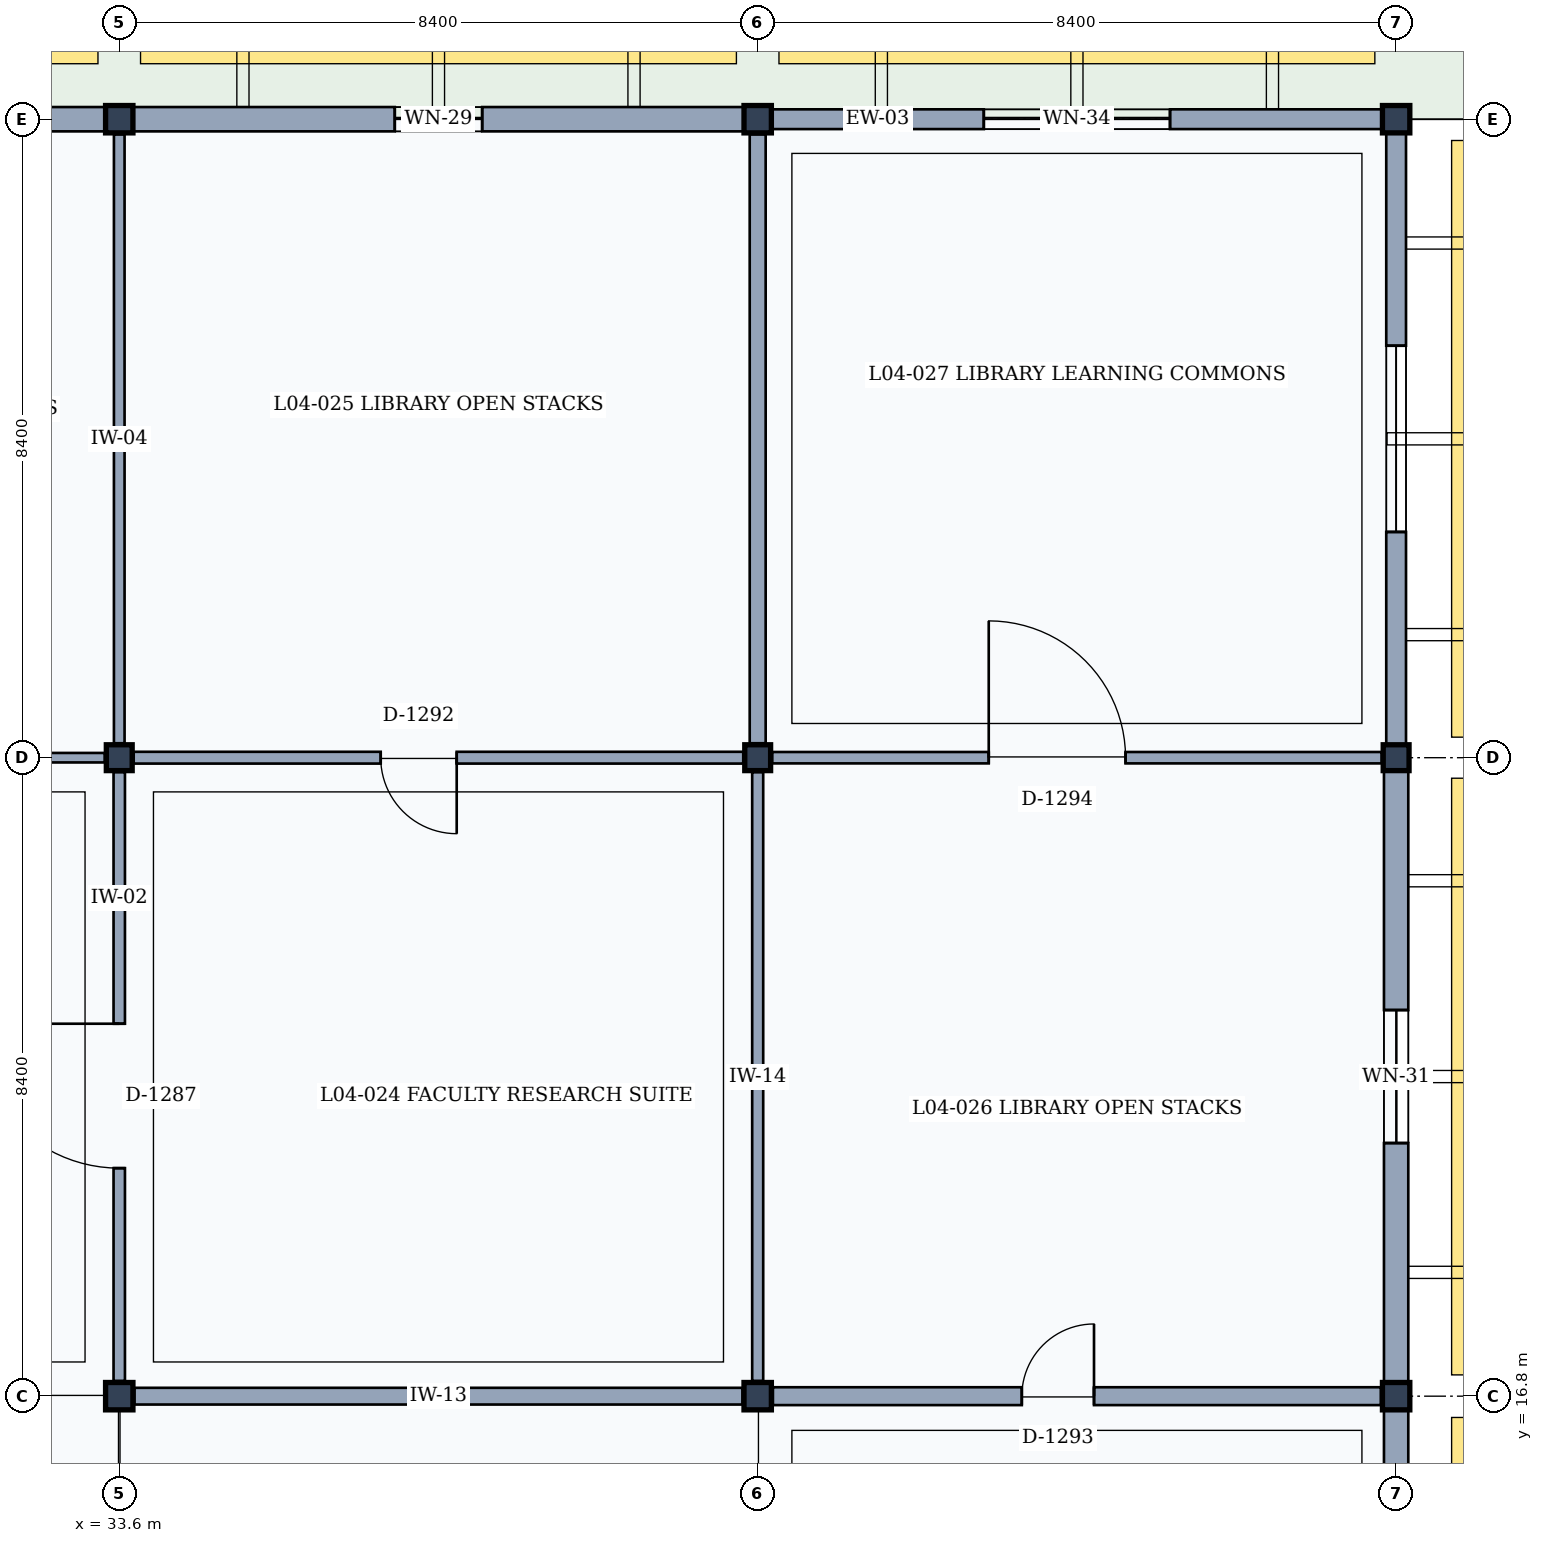
"""IFC4 building model, lengths in metres.
Left out: names, types, materials, properties, quantities, classifications, styles, units other than length and angle.
Written with IfcOpenShell. Run it as: python <this file> out.ifc"""

import sys

from ifc_helpers import new_model, si_unit, direction, frame, frame_2d, origin, origin_2d, place, context, subcontext, project, spatial, rectangle, extrude, element, fill, save


model = new_model("IFC4")
c1 = context("Model", 3, precision=1e-05, world=origin(), true_north=direction((0.0, 1.0)))
c2 = subcontext(c1, "Body", "Model", "MODEL_VIEW")
j1 = project(units=[si_unit("LENGTHUNIT", "METRE"), si_unit("PLANEANGLEUNIT", "RADIAN")], contexts=[c1])
p1 = place(None, origin())
s1 = spatial("IfcSite", under=j1, at=p1, CompositionType="ELEMENT")
p2 = place(p1, origin())
s2 = spatial("IfcBuilding", under=s1, at=p2, CompositionType="ELEMENT")
p3 = place(p2, frame((0.0, 0.0, 18.0)))
s3 = spatial("IfcBuildingStorey", under=s2, at=p3, CompositionType="ELEMENT", Elevation=18.0)
p4 = place(p3, frame((33.6, 16.8, 0.0), z_axis=(0.0, 0.0, 1.0), x_axis=(1.0, 0.0, 0.0)))
e1 = element("IfcColumn", 1, at=p4, inside=s3, PredefinedType="COLUMN", context=c2, shape_type="SweptSolid", body=[
    extrude(rectangle(XDim=0.36, YDim=0.36, at=origin_2d()), origin(), (0.0, 0.0, 1.0), 4.2),
])
p5 = place(p3, frame((33.6, 25.2, 0.0), z_axis=(0.0, 0.0, 1.0), x_axis=(1.0, 0.0, 0.0)))
e2 = element("IfcColumn", 2, at=p5, inside=s3, PredefinedType="COLUMN", context=c2, shape_type="SweptSolid", body=[
    extrude(rectangle(XDim=0.34, YDim=0.34, at=origin_2d()), origin(), (0.0, 0.0, 1.0), 4.2),
])
for number, where, z_axis, x_axis in (
    (3, (33.6, 33.6, 0.0), (0.0, 0.0, 1.0), (1.0, 0.0, 0.0)),
    (4, (42.0, 16.8, 0.0), (0.0, 0.0, 1.0), (1.0, 0.0, 0.0)),
):
    element("IfcColumn", number, at=place(p3, frame(where, z_axis=z_axis, x_axis=x_axis)), inside=s3, PredefinedType="COLUMN", context=c2, shape_type="SweptSolid", body=[
        extrude(rectangle(XDim=0.36, YDim=0.36, at=origin_2d()), origin(), (0.0, 0.0, 1.0), 4.2),
    ])
p6 = place(p3, frame((42.0, 25.2, 0.0), z_axis=(0.0, 0.0, 1.0), x_axis=(1.0, 0.0, 0.0)))
e5 = element("IfcColumn", 5, at=p6, inside=s3, PredefinedType="COLUMN", context=c2, shape_type="SweptSolid", body=[
    extrude(rectangle(XDim=0.34, YDim=0.34, at=origin_2d()), origin(), (0.0, 0.0, 1.0), 4.2),
])
for number, where, z_axis, x_axis in (
    (6, (42.0, 33.6, 0.0), (0.0, 0.0, 1.0), (1.0, 0.0, 0.0)),
    (7, (50.4, 16.8, 0.0), (0.0, 0.0, 1.0), (1.0, 0.0, 0.0)),
):
    element("IfcColumn", number, at=place(p3, frame(where, z_axis=z_axis, x_axis=x_axis)), inside=s3, PredefinedType="COLUMN", context=c2, shape_type="SweptSolid", body=[
        extrude(rectangle(XDim=0.36, YDim=0.36, at=origin_2d()), origin(), (0.0, 0.0, 1.0), 4.2),
    ])
p7 = place(p3, frame((50.4, 25.2, 0.0), z_axis=(0.0, 0.0, 1.0), x_axis=(1.0, 0.0, 0.0)))
e8 = element("IfcColumn", 8, at=p7, inside=s3, PredefinedType="COLUMN", context=c2, shape_type="SweptSolid", body=[
    extrude(rectangle(XDim=0.34, YDim=0.34, at=origin_2d()), origin(), (0.0, 0.0, 1.0), 4.2),
])
p8 = place(p3, frame((50.4, 33.6, 0.0), z_axis=(0.0, 0.0, 1.0), x_axis=(1.0, 0.0, 0.0)))
e9 = element("IfcColumn", 9, at=p8, inside=s3, PredefinedType="COLUMN", context=c2, shape_type="SweptSolid", body=[
    extrude(rectangle(XDim=0.36, YDim=0.36, at=origin_2d()), origin(), (0.0, 0.0, 1.0), 4.2),
])
p9 = place(p3, frame((25.38, 33.6, 0.0), z_axis=(0.0, 0.0, 1.0), x_axis=(1.0, 0.0, 0.0)))
e10 = element("IfcWall", 10, at=p9, inside=s3, PredefinedType="SOLIDWALL", context=c2, shape_type="SweptSolid", body=[
    extrude(rectangle(XDim=8.04, YDim=0.32, at=frame_2d((4.02, 0.0))), origin(), (0.0, 0.0, 1.0), 3.36),
])
p10 = place(p9, frame((3.095, 0.0, 0.9)))
e11 = element("IfcOpeningElement", 11, at=p10, cuts=e10, PredefinedType="OPENING", context=c2, shape_type="SweptSolid", body=[
    extrude(rectangle(XDim=1.85, YDim=1.65, at=frame_2d((0.925, 0.825))), frame((0.0, 0.17, 0.0), z_axis=(0.0, -1.0, 0.0), x_axis=(1.0, 0.0, 0.0)), (0.0, 0.0, 1.0), 0.34),
])
p11 = place(p3, frame((33.78, 33.6, 0.0), z_axis=(0.0, 0.0, 1.0), x_axis=(1.0, 0.0, 0.0)))
e12 = element("IfcWall", 12, at=p11, inside=s3, PredefinedType="SOLIDWALL", context=c2, shape_type="SweptSolid", body=[
    extrude(rectangle(XDim=8.04, YDim=0.32, at=frame_2d((4.02, 0.0))), origin(), (0.0, 0.0, 1.0), 3.36),
])
p12 = place(p11, frame((3.445, 0.0, 0.9)))
e13 = element("IfcOpeningElement", 13, at=p12, cuts=e12, PredefinedType="OPENING", context=c2, shape_type="SweptSolid", body=[
    extrude(rectangle(XDim=1.15, YDim=1.65, at=frame_2d((0.575, 0.825))), frame((0.0, 0.17, 0.0), z_axis=(0.0, -1.0, 0.0), x_axis=(1.0, 0.0, 0.0)), (0.0, 0.0, 1.0), 0.34),
])
p13 = place(p3, frame((50.4, 16.62, 0.0), z_axis=(0.0, 0.0, 1.0), x_axis=(0.0, -1.0, 0.0)))
e14 = element("IfcWall", 14, at=p13, inside=s3, PredefinedType="SOLIDWALL", context=c2, shape_type="SweptSolid", body=[
    extrude(rectangle(XDim=8.05, YDim=0.32, at=frame_2d((4.025, 0.0))), origin(), (0.0, 0.0, 1.0), 3.36),
])
p14 = place(p13, frame((2.65, 0.0, 0.9)))
e15 = element("IfcOpeningElement", 15, at=p14, cuts=e14, PredefinedType="OPENING", context=c2, shape_type="SweptSolid", body=[
    extrude(rectangle(XDim=2.75, YDim=1.85, at=frame_2d((1.375, 0.925))), frame((0.0, 0.17, 0.0), z_axis=(0.0, -1.0, 0.0), x_axis=(1.0, 0.0, 0.0)), (0.0, 0.0, 1.0), 0.34),
])
p15 = place(p3, frame((50.4, 25.03, 0.0), z_axis=(0.0, 0.0, 1.0), x_axis=(0.0, -1.0, 0.0)))
e16 = element("IfcWall", 16, at=p15, inside=s3, PredefinedType="SOLIDWALL", context=c2, shape_type="SweptSolid", body=[
    extrude(rectangle(XDim=8.05, YDim=0.32, at=frame_2d((4.025, 0.0))), origin(), (0.0, 0.0, 1.0), 3.36),
])
p16 = place(p15, frame((3.15, 0.0, 0.9)))
e17 = element("IfcOpeningElement", 17, at=p16, cuts=e16, PredefinedType="OPENING", context=c2, shape_type="SweptSolid", body=[
    extrude(rectangle(XDim=1.75, YDim=1.85, at=frame_2d((0.875, 0.925))), frame((0.0, 0.17, 0.0), z_axis=(0.0, -1.0, 0.0), x_axis=(1.0, 0.0, 0.0)), (0.0, 0.0, 1.0), 0.34),
])
p17 = place(p3, frame((42.18, 33.6, 0.0), z_axis=(0.0, 0.0, 1.0), x_axis=(1.0, 0.0, 0.0)))
e18 = element("IfcWall", 18, at=p17, inside=s3, PredefinedType="SOLIDWALL", context=c2, shape_type="SweptSolid", body=[
    extrude(rectangle(XDim=8.04, YDim=0.26, at=frame_2d((4.02, 0.0))), origin(), (0.0, 0.0, 1.0), 3.36),
])
p18 = place(p17, frame((2.795, 0.0, 0.9)))
e19 = element("IfcOpeningElement", 19, at=p18, cuts=e18, PredefinedType="OPENING", context=c2, shape_type="SweptSolid", body=[
    extrude(rectangle(XDim=2.45, YDim=1.9, at=frame_2d((1.225, 0.95))), frame((0.0, 0.14, 0.0), z_axis=(0.0, -1.0, 0.0), x_axis=(1.0, 0.0, 0.0)), (0.0, 0.0, 1.0), 0.28),
])
p19 = place(p3, frame((50.4, 33.42, 0.0), z_axis=(0.0, 0.0, 1.0), x_axis=(0.0, -1.0, 0.0)))
e20 = element("IfcWall", 20, at=p19, inside=s3, PredefinedType="SOLIDWALL", context=c2, shape_type="SweptSolid", body=[
    extrude(rectangle(XDim=8.05, YDim=0.26, at=frame_2d((4.025, 0.0))), origin(), (0.0, 0.0, 1.0), 3.36),
])
p20 = place(p19, frame((2.8, 0.0, 0.9)))
e21 = element("IfcOpeningElement", 21, at=p20, cuts=e20, PredefinedType="OPENING", context=c2, shape_type="SweptSolid", body=[
    extrude(rectangle(XDim=2.45, YDim=1.9, at=frame_2d((1.225, 0.95))), frame((0.0, 0.14, 0.0), z_axis=(0.0, -1.0, 0.0), x_axis=(1.0, 0.0, 0.0)), (0.0, 0.0, 1.0), 0.28),
])
p21 = place(p3, frame((33.6, 17.0, 0.0), z_axis=(0.0, 0.0, 1.0), x_axis=(0.0, 1.0, 0.0)))
e22 = element("IfcWall", 22, at=p21, inside=s3, PredefinedType="PARTITIONING", context=c2, shape_type="SweptSolid", body=[
    extrude(rectangle(XDim=8.01, YDim=0.15, at=frame_2d((4.005, 0.0))), origin(), (0.0, 0.0, 1.0), 3.32),
])
p22 = place(p21, frame((2.8, 0.0, 0.0)))
e23 = element("IfcOpeningElement", 23, at=p22, cuts=e22, PredefinedType="OPENING", context=c2, shape_type="SweptSolid", body=[
    extrude(rectangle(XDim=1.9, YDim=2.4, at=frame_2d((0.95, 1.2))), frame((0.0, 0.085, 0.0), z_axis=(0.0, -1.0, 0.0), x_axis=(1.0, 0.0, 0.0)), (0.0, 0.0, 1.0), 0.17),
])
p23 = place(p3, frame((25.39, 25.2, 0.0), z_axis=(0.0, 0.0, 1.0), x_axis=(1.0, 0.0, 0.0)))
e24 = element("IfcWall", 24, at=p23, inside=s3, PredefinedType="PARTITIONING", context=c2, shape_type="SweptSolid", body=[
    extrude(rectangle(XDim=8.02, YDim=0.125, at=frame_2d((4.01, 0.0))), origin(), (0.0, 0.0, 1.0), 3.32),
])
p24 = place(p23, frame((3.3, 0.0, 0.0)))
e25 = element("IfcOpeningElement", 25, at=p24, cuts=e24, PredefinedType="OPENING", context=c2, shape_type="SweptSolid", body=[
    extrude(rectangle(XDim=0.9, YDim=2.1, at=frame_2d((0.45, 1.05))), frame((0.0, 0.073, 0.0), z_axis=(0.0, -1.0, 0.0), x_axis=(1.0, 0.0, 0.0)), (0.0, 0.0, 1.0), 0.145),
])
p25 = place(p3, frame((33.6, 25.39, 0.0), z_axis=(0.0, 0.0, 1.0), x_axis=(0.0, 1.0, 0.0)))
e26 = element("IfcWall", 26, at=p25, inside=s3, PredefinedType="PARTITIONING", context=c2, shape_type="SweptSolid", body=[
    extrude(rectangle(XDim=8.01, YDim=0.14, at=frame_2d((4.005, 0.0))), origin(), (0.0, 0.0, 1.0), 3.32),
])
p26 = place(p3, frame((33.8, 16.8, 0.0), z_axis=(0.0, 0.0, 1.0), x_axis=(1.0, 0.0, 0.0)))
e27 = element("IfcWall", 27, at=p26, inside=s3, PredefinedType="PARTITIONING", context=c2, shape_type="SweptSolid", body=[
    extrude(rectangle(XDim=8.0, YDim=0.22, at=frame_2d((4.0, 0.0))), origin(), (0.0, 0.0, 1.0), 3.32),
])
p27 = place(p3, frame((42.0, 17.0, 0.0), z_axis=(0.0, 0.0, 1.0), x_axis=(0.0, 1.0, 0.0)))
e28 = element("IfcWall", 28, at=p27, inside=s3, PredefinedType="PARTITIONING", context=c2, shape_type="SweptSolid", body=[
    extrude(rectangle(XDim=8.01, YDim=0.145, at=frame_2d((4.005, 0.0))), origin(), (0.0, 0.0, 1.0), 3.32),
])
p28 = place(p3, frame((33.79, 25.2, 0.0), z_axis=(0.0, 0.0, 1.0), x_axis=(1.0, 0.0, 0.0)))
e29 = element("IfcWall", 29, at=p28, inside=s3, PredefinedType="PARTITIONING", context=c2, shape_type="SweptSolid", body=[
    extrude(rectangle(XDim=8.02, YDim=0.155, at=frame_2d((4.01, 0.0))), origin(), (0.0, 0.0, 1.0), 3.32),
])
p29 = place(p28, frame((3.25, 0.0, 0.0)))
e30 = element("IfcOpeningElement", 30, at=p29, cuts=e29, PredefinedType="OPENING", context=c2, shape_type="SweptSolid", body=[
    extrude(rectangle(XDim=1.0, YDim=2.15, at=frame_2d((0.5, 1.075))), frame((0.0, 0.087, 0.0), z_axis=(0.0, -1.0, 0.0), x_axis=(1.0, 0.0, 0.0)), (0.0, 0.0, 1.0), 0.175),
])
p30 = place(p3, frame((42.0, 25.39, 0.0), z_axis=(0.0, 0.0, 1.0), x_axis=(0.0, 1.0, 0.0)))
e31 = element("IfcWall", 31, at=p30, inside=s3, PredefinedType="PARTITIONING", context=c2, shape_type="SweptSolid", body=[
    extrude(rectangle(XDim=8.01, YDim=0.21, at=frame_2d((4.005, 0.0))), origin(), (0.0, 0.0, 1.0), 3.32),
])
p31 = place(p3, frame((42.2, 16.8, 0.0), z_axis=(0.0, 0.0, 1.0), x_axis=(1.0, 0.0, 0.0)))
e32 = element("IfcWall", 32, at=p31, inside=s3, PredefinedType="PARTITIONING", context=c2, shape_type="SweptSolid", body=[
    extrude(rectangle(XDim=8.0, YDim=0.235, at=frame_2d((4.0, 0.0))), origin(), (0.0, 0.0, 1.0), 3.32),
])
p32 = place(p31, frame((3.275, 0.0, 0.0)))
e33 = element("IfcOpeningElement", 33, at=p32, cuts=e32, PredefinedType="OPENING", context=c2, shape_type="SweptSolid", body=[
    extrude(rectangle(XDim=0.95, YDim=2.15, at=frame_2d((0.475, 1.075))), frame((0.0, 0.127, 0.0), z_axis=(0.0, -1.0, 0.0), x_axis=(1.0, 0.0, 0.0)), (0.0, 0.0, 1.0), 0.255),
])
p33 = place(p3, frame((42.19, 25.2, 0.0), z_axis=(0.0, 0.0, 1.0), x_axis=(1.0, 0.0, 0.0)))
e34 = element("IfcWall", 34, at=p33, inside=s3, PredefinedType="PARTITIONING", context=c2, shape_type="SweptSolid", body=[
    extrude(rectangle(XDim=8.02, YDim=0.15, at=frame_2d((4.01, 0.0))), origin(), (0.0, 0.0, 1.0), 3.32),
])
p34 = place(p33, frame((2.85, 0.0, 0.0)))
e35 = element("IfcOpeningElement", 35, at=p34, cuts=e34, PredefinedType="OPENING", context=c2, shape_type="SweptSolid", body=[
    extrude(rectangle(XDim=1.8, YDim=2.3, at=frame_2d((0.9, 1.15))), frame((0.0, 0.085, 0.0), z_axis=(0.0, -1.0, 0.0), x_axis=(1.0, 0.0, 0.0)), (0.0, 0.0, 1.0), 0.17),
])
p35 = place(p12, origin())
e36 = element("IfcWindow", 36, at=p35, inside=s3, PartitioningType="SINGLE_PANEL", PredefinedType="WINDOW", context=c2, shape_type="SweptSolid", body=[
    extrude(rectangle(XDim=1.15, YDim=1.65, at=frame_2d((0.575, 0.825))), frame((0.0, 0.03, 0.0), z_axis=(0.0, -1.0, 0.0), x_axis=(1.0, 0.0, 0.0)), (0.0, 0.0, 1.0), 0.06),
])
fill(e13, e36)
p36 = place(p16, origin())
e37 = element("IfcWindow", 37, at=p36, inside=s3, PartitioningType="SINGLE_PANEL", PredefinedType="WINDOW", context=c2, shape_type="SweptSolid", body=[
    extrude(rectangle(XDim=1.75, YDim=1.85, at=frame_2d((0.875, 0.925))), frame((0.0, 0.03, 0.0), z_axis=(0.0, -1.0, 0.0), x_axis=(1.0, 0.0, 0.0)), (0.0, 0.0, 1.0), 0.06),
])
fill(e17, e37)
p37 = place(p18, origin())
e38 = element("IfcWindow", 38, at=p37, inside=s3, PartitioningType="SINGLE_PANEL", PredefinedType="WINDOW", context=c2, shape_type="SweptSolid", body=[
    extrude(rectangle(XDim=2.45, YDim=1.9, at=frame_2d((1.225, 0.95))), frame((0.0, 0.03, 0.0), z_axis=(0.0, -1.0, 0.0), x_axis=(1.0, 0.0, 0.0)), (0.0, 0.0, 1.0), 0.06),
])
fill(e19, e38)
p38 = place(p20, origin())
e39 = element("IfcWindow", 39, at=p38, inside=s3, PartitioningType="SINGLE_PANEL", PredefinedType="WINDOW", context=c2, shape_type="SweptSolid", body=[
    extrude(rectangle(XDim=2.45, YDim=1.9, at=frame_2d((1.225, 0.95))), frame((0.0, 0.03, 0.0), z_axis=(0.0, -1.0, 0.0), x_axis=(1.0, 0.0, 0.0)), (0.0, 0.0, 1.0), 0.06),
])
fill(e21, e39)
p39 = place(p22, origin())
e40 = element("IfcDoor", 40, at=p39, inside=s3, OperationType="SINGLE_SWING_RIGHT", PredefinedType="DOOR", context=c2, shape_type="SweptSolid", body=[
    extrude(rectangle(XDim=1.9, YDim=2.4, at=frame_2d((0.95, 1.2))), frame((0.0, 0.025, 0.0), z_axis=(0.0, -1.0, 0.0), x_axis=(1.0, 0.0, 0.0)), (0.0, 0.0, 1.0), 0.05),
])
fill(e23, e40)
p40 = place(p29, frame((1.0, 0.0, 0.0), z_axis=(0.0, 0.0, 1.0), x_axis=(-1.0, 0.0, 0.0)))
e41 = element("IfcDoor", 41, at=p40, inside=s3, OperationType="SINGLE_SWING_LEFT", PredefinedType="DOOR", context=c2, shape_type="SweptSolid", body=[
    extrude(rectangle(XDim=1.0, YDim=2.15, at=frame_2d((0.5, 1.075))), frame((0.0, 0.025, 0.0), z_axis=(0.0, -1.0, 0.0), x_axis=(1.0, 0.0, 0.0)), (0.0, 0.0, 1.0), 0.05),
])
fill(e30, e41)
p41 = place(p32, origin())
e42 = element("IfcDoor", 42, at=p41, inside=s3, OperationType="SINGLE_SWING_RIGHT", PredefinedType="DOOR", context=c2, shape_type="SweptSolid", body=[
    extrude(rectangle(XDim=0.95, YDim=2.15, at=frame_2d((0.475, 1.075))), frame((0.0, 0.025, 0.0), z_axis=(0.0, -1.0, 0.0), x_axis=(1.0, 0.0, 0.0)), (0.0, 0.0, 1.0), 0.05),
])
fill(e33, e42)
p42 = place(p34, origin())
e43 = element("IfcDoor", 43, at=p42, inside=s3, OperationType="SINGLE_SWING_LEFT", PredefinedType="DOOR", context=c2, shape_type="SweptSolid", body=[
    extrude(rectangle(XDim=1.8, YDim=2.3, at=frame_2d((0.9, 1.15))), frame((0.0, 0.025, 0.0), z_axis=(0.0, -1.0, 0.0), x_axis=(1.0, 0.0, 0.0)), (0.0, 0.0, 1.0), 0.05),
])
fill(e35, e43)
save(model, sys.argv[1])
